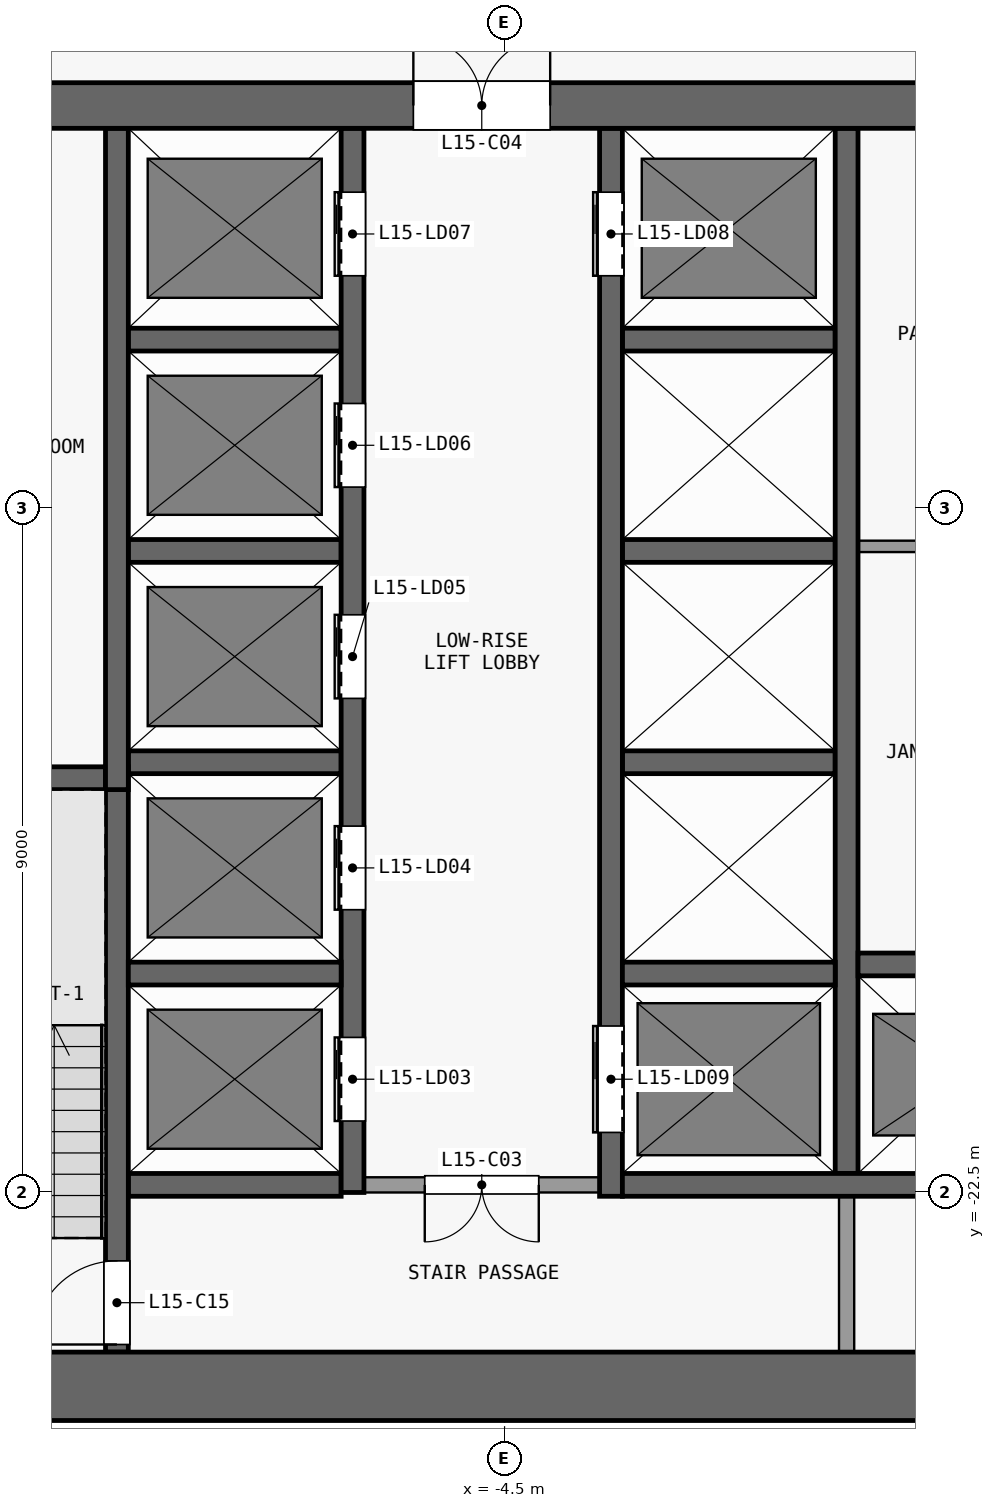
"""IFC4 building model, lengths in metres.
Left out: names, types, materials, properties, quantities, classifications, styles, units other than length and angle.
Written with IfcOpenShell. Run it as: python <this file> out.ifc"""

import sys

from ifc_helpers import new_model, si_unit, direction, frame, frame_2d, origin, place, context, subcontext, project, spatial, rectangle, extrude, element, fill, save


model = new_model("IFC4")
c1 = context("Model", 3, precision=1e-05, world=origin(), true_north=direction((0.0, 1.0)))
c2 = subcontext(c1, "Body", "Model", "MODEL_VIEW")
j1 = project(units=[si_unit("LENGTHUNIT", "METRE"), si_unit("PLANEANGLEUNIT", "RADIAN")], contexts=[c1])
p1 = place(None, origin())
s1 = spatial("IfcSite", under=j1, at=p1, CompositionType="ELEMENT")
p2 = place(p1, origin())
s2 = spatial("IfcBuilding", under=s1, at=p2, CompositionType="ELEMENT")
p3 = place(p2, frame((0.0, 0.0, 64.9)))
s3 = spatial("IfcBuildingStorey", under=s2, at=p3, CompositionType="ELEMENT", Elevation=64.9)
p4 = place(p3, frame((-13.5, -25.05, 0.0), z_axis=(0.0, 0.0, 1.0), x_axis=(1.0, 0.0, 0.0)))
e1 = element("IfcWall", 1, at=p4, inside=s3, PredefinedType="SHEAR", context=c2, shape_type="SweptSolid", body=[
    extrude(rectangle(XDim=27.0, YDim=0.9, at=frame_2d((13.5, 0.0))), origin(), (0.0, 0.0, 1.0), 3.3),
])
p5 = place(p3, frame((-13.5, -8.2, 0.0), z_axis=(0.0, 0.0, 1.0), x_axis=(1.0, 0.0, 0.0)))
e2 = element("IfcWall", 2, at=p5, inside=s3, PredefinedType="SHEAR", context=c2, shape_type="SweptSolid", body=[
    extrude(rectangle(XDim=27.0, YDim=0.6, at=frame_2d((13.5, 0.0))), origin(), (0.0, 0.0, 1.0), 3.3),
])
p6 = place(p5, frame((7.8, 0.0, 0.0)))
e3 = element("IfcOpeningElement", 3, at=p6, cuts=e2, PredefinedType="OPENING", context=c2, shape_type="SweptSolid", body=[
    extrude(rectangle(XDim=1.8, YDim=2.1, at=frame_2d((0.9, 1.05))), frame((0.0, 0.31, 0.0), z_axis=(0.0, -1.0, 0.0), x_axis=(1.0, 0.0, 0.0)), (0.0, 0.0, 1.0), 0.62),
])
p7 = place(p5, frame((17.4, 0.0, 0.0)))
e4 = element("IfcOpeningElement", 4, at=p7, cuts=e2, PredefinedType="OPENING", context=c2, shape_type="SweptSolid", body=[
    extrude(rectangle(XDim=1.8, YDim=2.1, at=frame_2d((0.9, 1.05))), frame((0.0, 0.31, 0.0), z_axis=(0.0, -1.0, 0.0), x_axis=(1.0, 0.0, 0.0)), (0.0, 0.0, 1.0), 0.62),
])
p8 = place(p5, frame((1.725, 0.0, 0.0)))
e5 = element("IfcOpeningElement", 5, at=p8, cuts=e2, PredefinedType="OPENING", context=c2, shape_type="SweptSolid", body=[
    extrude(rectangle(XDim=1.2, YDim=2.1, at=frame_2d((0.6, 1.05))), frame((0.0, 0.31, 0.0), z_axis=(0.0, -1.0, 0.0), x_axis=(1.0, 0.0, 0.0)), (0.0, 0.0, 1.0), 0.62),
])
p9 = place(p5, frame((23.375, 0.0, 0.0)))
e6 = element("IfcOpeningElement", 6, at=p9, cuts=e2, PredefinedType="OPENING", context=c2, shape_type="SweptSolid", body=[
    extrude(rectangle(XDim=0.9, YDim=2.1, at=frame_2d((0.45, 1.05))), frame((0.0, 0.31, 0.0), z_axis=(0.0, -1.0, 0.0), x_axis=(1.0, 0.0, 0.0)), (0.0, 0.0, 1.0), 0.62),
])
p10 = place(p3, frame((-9.45, -22.4, 0.0), z_axis=(0.0, 0.0, 1.0), x_axis=(1.0, 0.0, 0.0)))
e7 = element("IfcWall", 7, at=p10, inside=s3, PredefinedType="SHEAR", context=c2, shape_type="SweptSolid", body=[
    extrude(rectangle(XDim=2.8, YDim=0.3, at=frame_2d((1.4, 0.0))), origin(), (0.0, 0.0, 1.0), 3.3),
])
p11 = place(p3, frame((-3.25, -22.4, 0.0), z_axis=(0.0, 0.0, 1.0), x_axis=(-1.0, 0.0, 0.0)))
e8 = element("IfcWall", 8, at=p11, inside=s3, PredefinedType="PARTITIONING", context=c2, shape_type="SweptSolid", body=[
    extrude(rectangle(XDim=3.1, YDim=0.2, at=frame_2d((1.55, 0.0))), origin(), (0.0, 0.0, 1.0), 3.3),
])
p12 = place(p11, frame((0.8, 0.0, 0.0)))
e9 = element("IfcOpeningElement", 9, at=p12, cuts=e8, PredefinedType="OPENING", context=c2, shape_type="SweptSolid", body=[
    extrude(rectangle(XDim=1.5, YDim=2.1, at=frame_2d((0.75, 1.05))), frame((0.0, 0.11, 0.0), z_axis=(0.0, -1.0, 0.0), x_axis=(1.0, 0.0, 0.0)), (0.0, 0.0, 1.0), 0.22),
])
p13 = place(p3, frame((-2.95, -22.4, 0.0), z_axis=(0.0, 0.0, 1.0), x_axis=(1.0, 0.0, 0.0)))
e10 = element("IfcWall", 10, at=p13, inside=s3, PredefinedType="SHEAR", context=c2, shape_type="SweptSolid", body=[
    extrude(rectangle(XDim=6.2, YDim=0.3, at=frame_2d((3.1, 0.0))), origin(), (0.0, 0.0, 1.0), 3.3),
])
for number, where, z_axis, x_axis in (
    (11, (-9.45, -19.62, 0.0), (0.0, 0.0, 1.0), (1.0, 0.0, 0.0)),
    (12, (-2.95, -19.62, 0.0), (0.0, 0.0, 1.0), (1.0, 0.0, 0.0)),
):
    element("IfcWall", number, at=place(p3, frame(where, z_axis=z_axis, x_axis=x_axis)), inside=s3, PredefinedType="SHEAR", context=c2, shape_type="SweptSolid", body=[
        extrude(rectangle(XDim=2.8, YDim=0.3, at=frame_2d((1.4, 0.0))), origin(), (0.0, 0.0, 1.0), 3.3),
    ])
p14 = place(p3, frame((0.15, -19.5, 0.0), z_axis=(0.0, 0.0, 1.0), x_axis=(1.0, 0.0, 0.0)))
e13 = element("IfcWall", 13, at=p14, inside=s3, PredefinedType="SHEAR", context=c2, shape_type="SweptSolid", body=[
    extrude(rectangle(XDim=3.025, YDim=0.3, at=frame_2d((1.513, 0.0))), origin(), (0.0, 0.0, 1.0), 3.3),
])
p15 = place(p3, frame((-12.6, -17.05, 0.0), z_axis=(0.0, 0.0, 1.0), x_axis=(1.0, 0.0, 0.0)))
e14 = element("IfcWall", 14, at=p15, inside=s3, PredefinedType="SHEAR", context=c2, shape_type="SweptSolid", body=[
    extrude(rectangle(XDim=2.85, YDim=0.3, at=frame_2d((1.425, 0.0))), origin(), (0.0, 0.0, 1.0), 3.3),
])
for number, where, z_axis, x_axis in (
    (15, (-9.45, -16.84, 0.0), (0.0, 0.0, 1.0), (1.0, 0.0, 0.0)),
    (16, (-2.95, -16.84, 0.0), (0.0, 0.0, 1.0), (1.0, 0.0, 0.0)),
    (17, (-9.45, -14.06, 0.0), (0.0, 0.0, 1.0), (1.0, 0.0, 0.0)),
    (18, (-2.95, -14.06, 0.0), (0.0, 0.0, 1.0), (1.0, 0.0, 0.0)),
):
    element("IfcWall", number, at=place(p3, frame(where, z_axis=z_axis, x_axis=x_axis)), inside=s3, PredefinedType="SHEAR", context=c2, shape_type="SweptSolid", body=[
        extrude(rectangle(XDim=2.8, YDim=0.3, at=frame_2d((1.4, 0.0))), origin(), (0.0, 0.0, 1.0), 3.3),
    ])
p16 = place(p3, frame((0.15, -14.0, 0.0), z_axis=(0.0, 0.0, 1.0), x_axis=(1.0, 0.0, 0.0)))
e19 = element("IfcWall", 19, at=p16, inside=s3, PredefinedType="PARTITIONING", context=c2, shape_type="SweptSolid", body=[
    extrude(rectangle(XDim=2.875, YDim=0.15, at=frame_2d((1.438, 0.0))), origin(), (0.0, 0.0, 1.0), 3.3),
])
for number, where, z_axis, x_axis in (
    (20, (-9.45, -11.28, 0.0), (0.0, 0.0, 1.0), (1.0, 0.0, 0.0)),
    (21, (-2.95, -11.28, 0.0), (0.0, 0.0, 1.0), (1.0, 0.0, 0.0)),
):
    element("IfcWall", number, at=place(p3, frame(where, z_axis=z_axis, x_axis=x_axis)), inside=s3, PredefinedType="SHEAR", context=c2, shape_type="SweptSolid", body=[
        extrude(rectangle(XDim=2.8, YDim=0.3, at=frame_2d((1.4, 0.0))), origin(), (0.0, 0.0, 1.0), 3.3),
    ])
p17 = place(p3, frame((-9.6, -24.6, 0.0), z_axis=(0.0, 0.0, 1.0), x_axis=(0.0, 1.0, 0.0)))
e22 = element("IfcWall", 22, at=p17, inside=s3, PredefinedType="SHEAR", context=c2, shape_type="SweptSolid", body=[
    extrude(rectangle(XDim=7.7, YDim=0.3, at=frame_2d((3.85, 0.0))), origin(), (0.0, 0.0, 1.0), 3.3),
])
p18 = place(p17, frame((0.1, 0.0, 0.0)))
e23 = element("IfcOpeningElement", 23, at=p18, cuts=e22, PredefinedType="OPENING", context=c2, shape_type="SweptSolid", body=[
    extrude(rectangle(XDim=1.1, YDim=2.1, at=frame_2d((0.55, 1.05))), frame((0.0, 0.16, 0.0), z_axis=(0.0, -1.0, 0.0), x_axis=(1.0, 0.0, 0.0)), (0.0, 0.0, 1.0), 0.32),
])
p19 = place(p3, frame((-9.6, -17.2, 0.0), z_axis=(0.0, 0.0, 1.0), x_axis=(0.0, 1.0, 0.0)))
e24 = element("IfcWall", 24, at=p19, inside=s3, PredefinedType="SHEAR", context=c2, shape_type="SweptSolid", body=[
    extrude(rectangle(XDim=8.7, YDim=0.3, at=frame_2d((4.35, 0.0))), origin(), (0.0, 0.0, 1.0), 3.3),
])
p20 = place(p3, frame((-6.5, -22.5, 0.0), z_axis=(0.0, 0.0, 1.0), x_axis=(0.0, 1.0, 0.0)))
e25 = element("IfcWall", 25, at=p20, inside=s3, PredefinedType="SHEAR", context=c2, shape_type="SweptSolid", body=[
    extrude(rectangle(XDim=14.0, YDim=0.3, at=frame_2d((7.0, 0.0))), origin(), (0.0, 0.0, 1.0), 3.3),
])
p21 = place(p20, frame((0.94, 0.0, 0.0)))
e26 = element("IfcOpeningElement", 26, at=p21, cuts=e25, PredefinedType="OPENING", context=c2, shape_type="SweptSolid", body=[
    extrude(rectangle(XDim=1.1, YDim=2.1, at=frame_2d((0.55, 1.05))), frame((0.0, 0.16, 0.0), z_axis=(0.0, -1.0, 0.0), x_axis=(1.0, 0.0, 0.0)), (0.0, 0.0, 1.0), 0.32),
])
p22 = place(p20, frame((3.72, 0.0, 0.0)))
e27 = element("IfcOpeningElement", 27, at=p22, cuts=e25, PredefinedType="OPENING", context=c2, shape_type="SweptSolid", body=[
    extrude(rectangle(XDim=1.1, YDim=2.1, at=frame_2d((0.55, 1.05))), frame((0.0, 0.16, 0.0), z_axis=(0.0, -1.0, 0.0), x_axis=(1.0, 0.0, 0.0)), (0.0, 0.0, 1.0), 0.32),
])
p23 = place(p20, frame((6.5, 0.0, 0.0)))
e28 = element("IfcOpeningElement", 28, at=p23, cuts=e25, PredefinedType="OPENING", context=c2, shape_type="SweptSolid", body=[
    extrude(rectangle(XDim=1.1, YDim=2.1, at=frame_2d((0.55, 1.05))), frame((0.0, 0.16, 0.0), z_axis=(0.0, -1.0, 0.0), x_axis=(1.0, 0.0, 0.0)), (0.0, 0.0, 1.0), 0.32),
])
p24 = place(p20, frame((9.28, 0.0, 0.0)))
e29 = element("IfcOpeningElement", 29, at=p24, cuts=e25, PredefinedType="OPENING", context=c2, shape_type="SweptSolid", body=[
    extrude(rectangle(XDim=1.1, YDim=2.1, at=frame_2d((0.55, 1.05))), frame((0.0, 0.16, 0.0), z_axis=(0.0, -1.0, 0.0), x_axis=(1.0, 0.0, 0.0)), (0.0, 0.0, 1.0), 0.32),
])
p25 = place(p20, frame((12.06, 0.0, 0.0)))
e30 = element("IfcOpeningElement", 30, at=p25, cuts=e25, PredefinedType="OPENING", context=c2, shape_type="SweptSolid", body=[
    extrude(rectangle(XDim=1.1, YDim=2.1, at=frame_2d((0.55, 1.05))), frame((0.0, 0.16, 0.0), z_axis=(0.0, -1.0, 0.0), x_axis=(1.0, 0.0, 0.0)), (0.0, 0.0, 1.0), 0.32),
])
p26 = place(p3, frame((-3.1, -22.55, 0.0), z_axis=(0.0, 0.0, 1.0), x_axis=(0.0, 1.0, 0.0)))
e31 = element("IfcWall", 31, at=p26, inside=s3, PredefinedType="SHEAR", context=c2, shape_type="SweptSolid", body=[
    extrude(rectangle(XDim=14.05, YDim=0.3, at=frame_2d((7.025, 0.0))), origin(), (0.0, 0.0, 1.0), 3.3),
])
p27 = place(p26, frame((12.11, 0.0, 0.0)))
e32 = element("IfcOpeningElement", 32, at=p27, cuts=e31, PredefinedType="OPENING", context=c2, shape_type="SweptSolid", body=[
    extrude(rectangle(XDim=1.1, YDim=2.1, at=frame_2d((0.55, 1.05))), frame((0.0, 0.16, 0.0), z_axis=(0.0, -1.0, 0.0), x_axis=(1.0, 0.0, 0.0)), (0.0, 0.0, 1.0), 0.32),
])
p28 = place(p26, frame((0.84, 0.0, 0.0)))
e33 = element("IfcOpeningElement", 33, at=p28, cuts=e31, PredefinedType="OPENING", context=c2, shape_type="SweptSolid", body=[
    extrude(rectangle(XDim=1.4, YDim=2.1, at=frame_2d((0.7, 1.05))), frame((0.0, 0.16, 0.0), z_axis=(0.0, -1.0, 0.0), x_axis=(1.0, 0.0, 0.0)), (0.0, 0.0, 1.0), 0.32),
])
p29 = place(p3, frame((0.0, -24.6, 0.0), z_axis=(0.0, 0.0, 1.0), x_axis=(0.0, 1.0, 0.0)))
e34 = element("IfcWall", 34, at=p29, inside=s3, PredefinedType="PARTITIONING", context=c2, shape_type="SweptSolid", body=[
    extrude(rectangle(XDim=2.05, YDim=0.2, at=frame_2d((1.025, 0.0))), origin(), (0.0, 0.0, 1.0), 3.3),
])
p30 = place(p3, frame((0.0, -22.25, 0.0), z_axis=(0.0, 0.0, 1.0), x_axis=(0.0, 1.0, 0.0)))
e35 = element("IfcWall", 35, at=p30, inside=s3, PredefinedType="SHEAR", context=c2, shape_type="SweptSolid", body=[
    extrude(rectangle(XDim=13.75, YDim=0.3, at=frame_2d((6.875, 0.0))), origin(), (0.0, 0.0, 1.0), 3.3),
])
p31 = place(p21, origin())
e36 = element("IfcDoor", 36, at=p31, inside=s3, OperationType="DOUBLE_DOOR_SLIDING", PredefinedType="DOOR", context=c2, shape_type="SweptSolid", body=[
    extrude(rectangle(XDim=1.1, YDim=2.1, at=frame_2d((0.55, 1.05))), frame((0.0, 0.025, 0.0), z_axis=(0.0, -1.0, 0.0), x_axis=(1.0, 0.0, 0.0)), (0.0, 0.0, 1.0), 0.05),
])
fill(e26, e36)
p32 = place(p22, origin())
e37 = element("IfcDoor", 37, at=p32, inside=s3, OperationType="DOUBLE_DOOR_SLIDING", PredefinedType="DOOR", context=c2, shape_type="SweptSolid", body=[
    extrude(rectangle(XDim=1.1, YDim=2.1, at=frame_2d((0.55, 1.05))), frame((0.0, 0.025, 0.0), z_axis=(0.0, -1.0, 0.0), x_axis=(1.0, 0.0, 0.0)), (0.0, 0.0, 1.0), 0.05),
])
fill(e27, e37)
p33 = place(p23, origin())
e38 = element("IfcDoor", 38, at=p33, inside=s3, OperationType="DOUBLE_DOOR_SLIDING", PredefinedType="DOOR", context=c2, shape_type="SweptSolid", body=[
    extrude(rectangle(XDim=1.1, YDim=2.1, at=frame_2d((0.55, 1.05))), frame((0.0, 0.025, 0.0), z_axis=(0.0, -1.0, 0.0), x_axis=(1.0, 0.0, 0.0)), (0.0, 0.0, 1.0), 0.05),
])
fill(e28, e38)
p34 = place(p24, origin())
e39 = element("IfcDoor", 39, at=p34, inside=s3, OperationType="DOUBLE_DOOR_SLIDING", PredefinedType="DOOR", context=c2, shape_type="SweptSolid", body=[
    extrude(rectangle(XDim=1.1, YDim=2.1, at=frame_2d((0.55, 1.05))), frame((0.0, 0.025, 0.0), z_axis=(0.0, -1.0, 0.0), x_axis=(1.0, 0.0, 0.0)), (0.0, 0.0, 1.0), 0.05),
])
fill(e29, e39)
p35 = place(p25, origin())
e40 = element("IfcDoor", 40, at=p35, inside=s3, OperationType="DOUBLE_DOOR_SLIDING", PredefinedType="DOOR", context=c2, shape_type="SweptSolid", body=[
    extrude(rectangle(XDim=1.1, YDim=2.1, at=frame_2d((0.55, 1.05))), frame((0.0, 0.025, 0.0), z_axis=(0.0, -1.0, 0.0), x_axis=(1.0, 0.0, 0.0)), (0.0, 0.0, 1.0), 0.05),
])
fill(e30, e40)
p36 = place(p27, origin())
e41 = element("IfcDoor", 41, at=p36, inside=s3, OperationType="DOUBLE_DOOR_SLIDING", PredefinedType="DOOR", context=c2, shape_type="SweptSolid", body=[
    extrude(rectangle(XDim=1.1, YDim=2.1, at=frame_2d((0.55, 1.05))), frame((0.0, 0.025, 0.0), z_axis=(0.0, -1.0, 0.0), x_axis=(1.0, 0.0, 0.0)), (0.0, 0.0, 1.0), 0.05),
])
fill(e32, e41)
p37 = place(p28, origin())
e42 = element("IfcDoor", 42, at=p37, inside=s3, OperationType="DOUBLE_DOOR_SLIDING", PredefinedType="DOOR", context=c2, shape_type="SweptSolid", body=[
    extrude(rectangle(XDim=1.4, YDim=2.1, at=frame_2d((0.7, 1.05))), frame((0.0, 0.025, 0.0), z_axis=(0.0, -1.0, 0.0), x_axis=(1.0, 0.0, 0.0)), (0.0, 0.0, 1.0), 0.05),
])
fill(e33, e42)
p38 = place(p12, origin())
e43 = element("IfcDoor", 43, at=p38, inside=s3, OperationType="DOUBLE_DOOR_SINGLE_SWING", PredefinedType="DOOR", context=c2, shape_type="SweptSolid", body=[
    extrude(rectangle(XDim=1.5, YDim=2.1, at=frame_2d((0.75, 1.05))), frame((0.0, 0.025, 0.0), z_axis=(0.0, -1.0, 0.0), x_axis=(1.0, 0.0, 0.0)), (0.0, 0.0, 1.0), 0.05),
])
fill(e9, e43)
p39 = place(p6, origin())
e44 = element("IfcDoor", 44, at=p39, inside=s3, OperationType="DOUBLE_DOOR_SINGLE_SWING", PredefinedType="DOOR", context=c2, shape_type="SweptSolid", body=[
    extrude(rectangle(XDim=1.8, YDim=2.1, at=frame_2d((0.9, 1.05))), frame((0.0, 0.025, 0.0), z_axis=(0.0, -1.0, 0.0), x_axis=(1.0, 0.0, 0.0)), (0.0, 0.0, 1.0), 0.05),
])
fill(e3, e44)
p40 = place(p18, origin())
e45 = element("IfcDoor", 45, at=p40, inside=s3, OperationType="SINGLE_SWING_LEFT", PredefinedType="DOOR", context=c2, shape_type="SweptSolid", body=[
    extrude(rectangle(XDim=1.1, YDim=2.1, at=frame_2d((0.55, 1.05))), frame((0.0, 0.025, 0.0), z_axis=(0.0, -1.0, 0.0), x_axis=(1.0, 0.0, 0.0)), (0.0, 0.0, 1.0), 0.05),
])
fill(e23, e45)
save(model, sys.argv[1])
